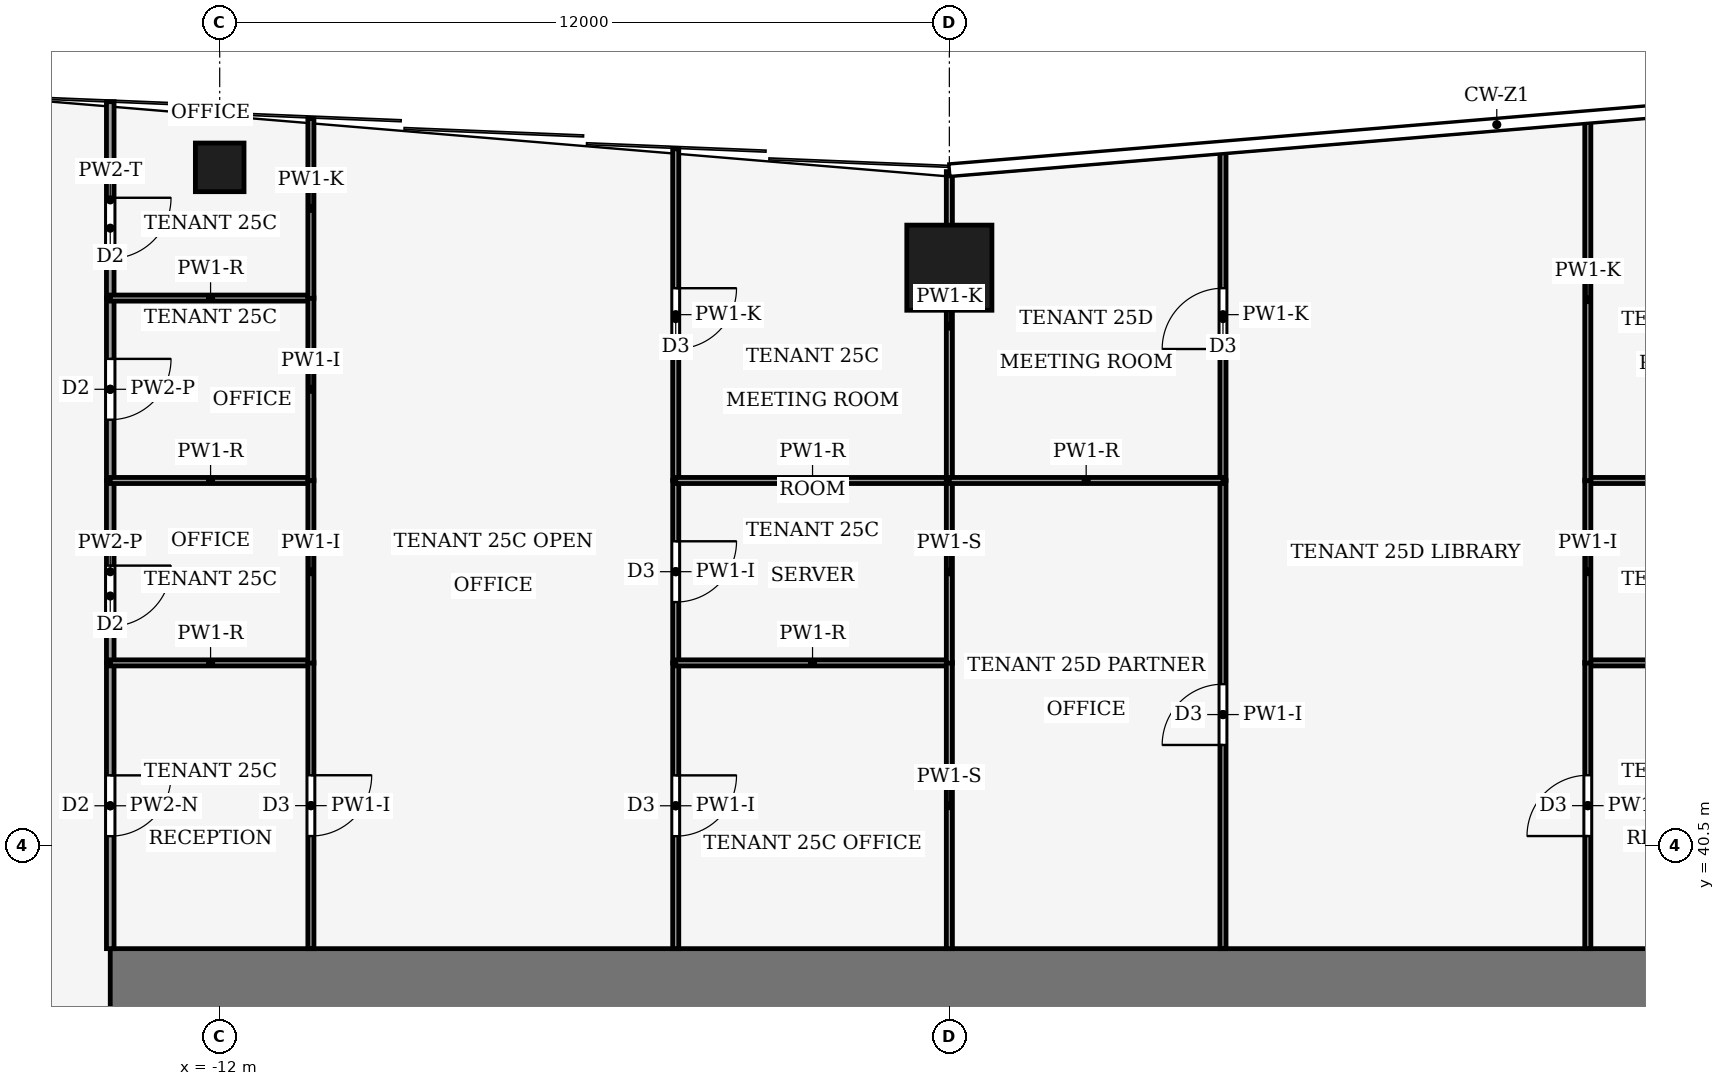
"""IFC4 building model, lengths in metres.
Left out: names, types, materials, properties, quantities, classifications, styles, units other than length and angle.
Written with IfcOpenShell. Run it as: python <this file> out.ifc"""

import sys

from ifc_helpers import new_model, si_unit, direction, frame, frame_2d, origin, origin_2d, place, context, subcontext, project, spatial, rectangle, hollow_rectangle, extrude, element, fill, save


model = new_model("IFC4")
c1 = context("Model", 3, precision=1e-05, world=origin(), true_north=direction((0.0, 1.0)))
c2 = subcontext(c1, "Body", "Model", "MODEL_VIEW")
j1 = project(units=[si_unit("LENGTHUNIT", "METRE"), si_unit("PLANEANGLEUNIT", "RADIAN")], contexts=[c1])
p1 = place(None, origin())
s1 = spatial("IfcSite", under=j1, at=p1, CompositionType="ELEMENT")
p2 = place(p1, origin())
s2 = spatial("IfcBuilding", under=s1, at=p2, CompositionType="ELEMENT")
p3 = place(p2, frame((0.0, 0.0, 110.0)))
s3 = spatial("IfcBuildingStorey", under=s2, at=p3, CompositionType="ELEMENT", Elevation=110.0)
p4 = place(p3, frame((-13.8, 38.2, -0.13), z_axis=(0.0, 0.0, 1.0), x_axis=(1.0, 0.0, 0.0)))
e1 = element("IfcWall", 1, at=p4, inside=s3, PredefinedType="SHEAR", context=c2, shape_type="SweptSolid", body=[
    extrude(rectangle(XDim=27.6, YDim=1.2, at=frame_2d((13.8, 0.0))), origin(), (0.0, 0.0, 1.0), 3.88),
])
p5 = place(p3, frame((0.0, 50.0, 0.0), z_axis=(0.0, 0.0, 1.0), x_axis=(1.0, 0.0, 0.0)))
e2 = element("IfcColumn", 2, at=p5, inside=s3, PredefinedType="COLUMN", context=c2, shape_type="SweptSolid", body=[
    extrude(hollow_rectangle(XDim=1.4, YDim=1.4, WallThickness=0.08, at=origin_2d()), origin(), (0.0, 0.0, 1.0), 4.0),
])
p6 = place(p3, frame((-12.0, 51.65, 0.0), z_axis=(0.0, 0.0, 1.0), x_axis=(1.0, 0.0, 0.0)))
e3 = element("IfcColumn", 3, at=p6, inside=s3, PredefinedType="COLUMN", context=c2, shape_type="SweptSolid", body=[
    extrude(hollow_rectangle(XDim=0.8, YDim=0.8, WallThickness=0.04, at=origin_2d()), origin(), (0.0, 0.0, 1.0), 4.0),
])
p7 = place(p3, frame((-13.8, 43.5, 0.0), z_axis=(0.0, 0.0, 1.0), x_axis=(0.0, -1.0, 0.0)))
e4 = element("IfcWall", 4, at=p7, inside=s3, PredefinedType="PARTITIONING", context=c2, shape_type="SweptSolid", body=[
    extrude(rectangle(XDim=4.7, YDim=0.125, at=frame_2d((2.35, 0.0))), origin(), (0.0, 0.0, 1.0), 3.02),
])
p8 = place(p7, frame((1.85, 0.0, 0.0)))
e5 = element("IfcOpeningElement", 5, at=p8, cuts=e4, PredefinedType="OPENING", context=c2, shape_type="SweptSolid", body=[
    extrude(rectangle(XDim=1.0, YDim=2.1, at=frame_2d((0.5, 1.05))), frame((0.0, 0.073, 0.0), z_axis=(0.0, -1.0, 0.0), x_axis=(1.0, 0.0, 0.0)), (0.0, 0.0, 1.0), 0.145),
])
p9 = place(p3, frame((-13.8, 46.5, 0.0), z_axis=(0.0, 0.0, 1.0), x_axis=(0.0, -1.0, 0.0)))
e6 = element("IfcWall", 6, at=p9, inside=s3, PredefinedType="PARTITIONING", context=c2, shape_type="SweptSolid", body=[
    extrude(rectangle(XDim=3.0, YDim=0.125, at=frame_2d((1.5, 0.0))), origin(), (0.0, 0.0, 1.0), 3.75),
])
p10 = place(p9, frame((1.4, 0.0, 0.0)))
e7 = element("IfcOpeningElement", 7, at=p10, cuts=e6, PredefinedType="OPENING", context=c2, shape_type="SweptSolid", body=[
    extrude(rectangle(XDim=1.0, YDim=2.1, at=frame_2d((0.5, 1.05))), frame((0.0, 0.073, 0.0), z_axis=(0.0, -1.0, 0.0), x_axis=(1.0, 0.0, 0.0)), (0.0, 0.0, 1.0), 0.145),
])
p11 = place(p3, frame((-13.8, 49.5, 0.0), z_axis=(0.0, 0.0, 1.0), x_axis=(0.0, -1.0, 0.0)))
e8 = element("IfcWall", 8, at=p11, inside=s3, PredefinedType="PARTITIONING", context=c2, shape_type="SweptSolid", body=[
    extrude(rectangle(XDim=3.0, YDim=0.125, at=frame_2d((1.5, 0.0))), origin(), (0.0, 0.0, 1.0), 3.75),
])
p12 = place(p11, frame((1.0, 0.0, 0.0)))
e9 = element("IfcOpeningElement", 9, at=p12, cuts=e8, PredefinedType="OPENING", context=c2, shape_type="SweptSolid", body=[
    extrude(rectangle(XDim=1.0, YDim=2.1, at=frame_2d((0.5, 1.05))), frame((0.0, 0.073, 0.0), z_axis=(0.0, -1.0, 0.0), x_axis=(1.0, 0.0, 0.0)), (0.0, 0.0, 1.0), 0.145),
])
p13 = place(p3, frame((-13.8, 52.73, 0.0), z_axis=(0.0, 0.0, 1.0), x_axis=(0.0, -1.0, 0.0)))
e10 = element("IfcWall", 10, at=p13, inside=s3, PredefinedType="PARTITIONING", context=c2, shape_type="SweptSolid", body=[
    extrude(rectangle(XDim=3.23, YDim=0.125, at=frame_2d((1.615, 0.0))), origin(), (0.0, 0.0, 1.0), 2.92),
])
p14 = place(p13, frame((1.58, 0.0, 0.0)))
e11 = element("IfcOpeningElement", 11, at=p14, cuts=e10, PredefinedType="OPENING", context=c2, shape_type="SweptSolid", body=[
    extrude(rectangle(XDim=1.0, YDim=2.1, at=frame_2d((0.5, 1.05))), frame((0.0, 0.073, 0.0), z_axis=(0.0, -1.0, 0.0), x_axis=(1.0, 0.0, 0.0)), (0.0, 0.0, 1.0), 0.145),
])
p15 = place(p3, frame((-10.5, 43.5, 0.0), z_axis=(0.0, 0.0, 1.0), x_axis=(-1.0, 0.0, 0.0)))
e12 = element("IfcWall", 12, at=p15, inside=s3, PredefinedType="PARTITIONING", context=c2, shape_type="SweptSolid", body=[
    extrude(rectangle(XDim=3.3, YDim=0.1, at=frame_2d((1.65, 0.0))), origin(), (0.0, 0.0, 1.0), 3.27),
])
p16 = place(p3, frame((-10.5, 43.504, 0.0), z_axis=(0.0, 0.0, 1.0), x_axis=(0.0, -1.0, 0.0)))
e13 = element("IfcWall", 13, at=p16, inside=s3, PredefinedType="PARTITIONING", context=c2, shape_type="SweptSolid", body=[
    extrude(rectangle(XDim=4.704, YDim=0.1, at=frame_2d((2.352, 0.0))), origin(), (0.0, 0.0, 1.0), 3.75),
])
p17 = place(p16, frame((1.852, 0.0, 0.0)))
e14 = element("IfcOpeningElement", 14, at=p17, cuts=e13, PredefinedType="OPENING", context=c2, shape_type="SweptSolid", body=[
    extrude(rectangle(XDim=1.0, YDim=2.1, at=frame_2d((0.5, 1.05))), frame((0.0, 0.06, 0.0), z_axis=(0.0, -1.0, 0.0), x_axis=(1.0, 0.0, 0.0)), (0.0, 0.0, 1.0), 0.12),
])
p18 = place(p3, frame((-10.5, 46.5, 0.0), z_axis=(0.0, 0.0, 1.0), x_axis=(-1.0, 0.0, 0.0)))
e15 = element("IfcWall", 15, at=p18, inside=s3, PredefinedType="PARTITIONING", context=c2, shape_type="SweptSolid", body=[
    extrude(rectangle(XDim=3.3, YDim=0.1, at=frame_2d((1.65, 0.0))), origin(), (0.0, 0.0, 1.0), 3.27),
])
p19 = place(p3, frame((-10.5, 43.496, 0.0), z_axis=(0.0, 0.0, 1.0), x_axis=(0.0, 1.0, 0.0)))
e16 = element("IfcWall", 16, at=p19, inside=s3, PredefinedType="PARTITIONING", context=c2, shape_type="SweptSolid", body=[
    extrude(rectangle(XDim=3.008, YDim=0.1, at=frame_2d((1.504, 0.0))), origin(), (0.0, 0.0, 1.0), 3.75),
])
p20 = place(p3, frame((-10.5, 49.5, 0.0), z_axis=(0.0, 0.0, 1.0), x_axis=(-1.0, 0.0, 0.0)))
e17 = element("IfcWall", 17, at=p20, inside=s3, PredefinedType="PARTITIONING", context=c2, shape_type="SweptSolid", body=[
    extrude(rectangle(XDim=3.3, YDim=0.1, at=frame_2d((1.65, 0.0))), origin(), (0.0, 0.0, 1.0), 3.27),
])
p21 = place(p3, frame((-10.5, 46.496, 0.0), z_axis=(0.0, 0.0, 1.0), x_axis=(0.0, 1.0, 0.0)))
e18 = element("IfcWall", 18, at=p21, inside=s3, PredefinedType="PARTITIONING", context=c2, shape_type="SweptSolid", body=[
    extrude(rectangle(XDim=3.008, YDim=0.1, at=frame_2d((1.504, 0.0))), origin(), (0.0, 0.0, 1.0), 3.75),
])
p22 = place(p3, frame((-10.5, 49.496, 0.0), z_axis=(0.0, 0.0, 1.0), x_axis=(0.0, 1.0, 0.0)))
e19 = element("IfcWall", 19, at=p22, inside=s3, PredefinedType="PARTITIONING", context=c2, shape_type="SweptSolid", body=[
    extrude(rectangle(XDim=2.959, YDim=0.1, at=frame_2d((1.479, 0.0))), origin(), (0.0, 0.0, 1.0), 2.92),
])
p23 = place(p3, frame((-4.5, 43.5, 0.0), z_axis=(0.0, 0.0, 1.0), x_axis=(0.0, -1.0, 0.0)))
e20 = element("IfcWall", 20, at=p23, inside=s3, PredefinedType="PARTITIONING", context=c2, shape_type="SweptSolid", body=[
    extrude(rectangle(XDim=4.7, YDim=0.1, at=frame_2d((2.35, 0.0))), origin(), (0.0, 0.0, 1.0), 3.75),
])
p24 = place(p23, frame((1.85, 0.0, 0.0)))
e21 = element("IfcOpeningElement", 21, at=p24, cuts=e20, PredefinedType="OPENING", context=c2, shape_type="SweptSolid", body=[
    extrude(rectangle(XDim=1.0, YDim=2.1, at=frame_2d((0.5, 1.05))), frame((0.0, 0.06, 0.0), z_axis=(0.0, -1.0, 0.0), x_axis=(1.0, 0.0, 0.0)), (0.0, 0.0, 1.0), 0.12),
])
p25 = place(p3, frame((-4.5, 46.5, 0.0), z_axis=(0.0, 0.0, 1.0), x_axis=(0.0, -1.0, 0.0)))
e22 = element("IfcWall", 22, at=p25, inside=s3, PredefinedType="PARTITIONING", context=c2, shape_type="SweptSolid", body=[
    extrude(rectangle(XDim=3.0, YDim=0.1, at=frame_2d((1.5, 0.0))), origin(), (0.0, 0.0, 1.0), 3.75),
])
p26 = place(p25, frame((1.0, 0.0, 0.0)))
e23 = element("IfcOpeningElement", 23, at=p26, cuts=e22, PredefinedType="OPENING", context=c2, shape_type="SweptSolid", body=[
    extrude(rectangle(XDim=1.0, YDim=2.1, at=frame_2d((0.5, 1.05))), frame((0.0, 0.06, 0.0), z_axis=(0.0, -1.0, 0.0), x_axis=(1.0, 0.0, 0.0)), (0.0, 0.0, 1.0), 0.12),
])
p27 = place(p3, frame((-4.5, 51.955, 0.0), z_axis=(0.0, 0.0, 1.0), x_axis=(0.0, -1.0, 0.0)))
e24 = element("IfcWall", 24, at=p27, inside=s3, PredefinedType="PARTITIONING", context=c2, shape_type="SweptSolid", body=[
    extrude(rectangle(XDim=5.455, YDim=0.1, at=frame_2d((2.728, 0.0))), origin(), (0.0, 0.0, 1.0), 2.92),
])
p28 = place(p27, frame((2.292, 0.0, 0.0)))
e25 = element("IfcOpeningElement", 25, at=p28, cuts=e24, PredefinedType="OPENING", context=c2, shape_type="SweptSolid", body=[
    extrude(rectangle(XDim=1.0, YDim=2.1, at=frame_2d((0.5, 1.05))), frame((0.0, 0.06, 0.0), z_axis=(0.0, -1.0, 0.0), x_axis=(1.0, 0.0, 0.0)), (0.0, 0.0, 1.0), 0.12),
])
p29 = place(p3, frame((0.0, 43.5, 0.0), z_axis=(0.0, 0.0, 1.0), x_axis=(-1.0, 0.0, 0.0)))
e26 = element("IfcWall", 26, at=p29, inside=s3, PredefinedType="PARTITIONING", context=c2, shape_type="SweptSolid", body=[
    extrude(rectangle(XDim=4.5, YDim=0.1, at=frame_2d((2.25, 0.0))), origin(), (0.0, 0.0, 1.0), 3.27),
])
p30 = place(p3, frame((0.0, 38.8, 0.0), z_axis=(0.0, 0.0, 1.0), x_axis=(0.0, 1.0, 0.0)))
e27 = element("IfcWall", 27, at=p30, inside=s3, PredefinedType="PARTITIONING", context=c2, shape_type="SweptSolid", body=[
    extrude(rectangle(XDim=4.704, YDim=0.1, at=frame_2d((2.352, 0.0))), origin(), (0.0, 0.0, 1.0), 3.32),
])
p31 = place(p3, frame((0.0, 46.5, 0.0), z_axis=(0.0, 0.0, 1.0), x_axis=(-1.0, 0.0, 0.0)))
e28 = element("IfcWall", 28, at=p31, inside=s3, PredefinedType="PARTITIONING", context=c2, shape_type="SweptSolid", body=[
    extrude(rectangle(XDim=4.5, YDim=0.1, at=frame_2d((2.25, 0.0))), origin(), (0.0, 0.0, 1.0), 3.27),
])
p32 = place(p3, frame((0.0, 43.496, 0.0), z_axis=(0.0, 0.0, 1.0), x_axis=(0.0, 1.0, 0.0)))
e29 = element("IfcWall", 29, at=p32, inside=s3, PredefinedType="PARTITIONING", context=c2, shape_type="SweptSolid", body=[
    extrude(rectangle(XDim=3.004, YDim=0.1, at=frame_2d((1.502, 0.0))), origin(), (0.0, 0.0, 1.0), 3.32),
])
p33 = place(p3, frame((0.0, 46.5, 0.0), z_axis=(0.0, 0.0, 1.0), x_axis=(0.0, 1.0, 0.0)))
e30 = element("IfcWall", 30, at=p33, inside=s3, PredefinedType="PARTITIONING", context=c2, shape_type="SweptSolid", body=[
    extrude(rectangle(XDim=5.08, YDim=0.1, at=frame_2d((2.54, 0.0))), origin(), (0.0, 0.0, 1.0), 2.92),
])
p34 = place(p3, frame((13.8, 43.5, 0.0), z_axis=(0.0, 0.0, 1.0), x_axis=(-1.0, 0.0, 0.0)))
e31 = element("IfcWall", 31, at=p34, inside=s3, PredefinedType="PARTITIONING", context=c2, shape_type="SweptSolid", body=[
    extrude(rectangle(XDim=3.3, YDim=0.1, at=frame_2d((1.65, 0.0))), origin(), (0.0, 0.0, 1.0), 3.27),
])
p35 = place(p3, frame((10.5, 38.8, 0.0), z_axis=(0.0, 0.0, 1.0), x_axis=(0.0, 1.0, 0.0)))
e32 = element("IfcWall", 32, at=p35, inside=s3, PredefinedType="PARTITIONING", context=c2, shape_type="SweptSolid", body=[
    extrude(rectangle(XDim=4.704, YDim=0.1, at=frame_2d((2.352, 0.0))), origin(), (0.0, 0.0, 1.0), 3.75),
])
p36 = place(p35, frame((1.852, 0.0, 0.0)))
e33 = element("IfcOpeningElement", 33, at=p36, cuts=e32, PredefinedType="OPENING", context=c2, shape_type="SweptSolid", body=[
    extrude(rectangle(XDim=1.0, YDim=2.1, at=frame_2d((0.5, 1.05))), frame((0.0, 0.06, 0.0), z_axis=(0.0, -1.0, 0.0), x_axis=(1.0, 0.0, 0.0)), (0.0, 0.0, 1.0), 0.12),
])
p37 = place(p3, frame((13.8, 46.5, 0.0), z_axis=(0.0, 0.0, 1.0), x_axis=(-1.0, 0.0, 0.0)))
e34 = element("IfcWall", 34, at=p37, inside=s3, PredefinedType="PARTITIONING", context=c2, shape_type="SweptSolid", body=[
    extrude(rectangle(XDim=3.3, YDim=0.1, at=frame_2d((1.65, 0.0))), origin(), (0.0, 0.0, 1.0), 3.27),
])
p38 = place(p3, frame((10.5, 46.504, 0.0), z_axis=(0.0, 0.0, 1.0), x_axis=(0.0, -1.0, 0.0)))
e35 = element("IfcWall", 35, at=p38, inside=s3, PredefinedType="PARTITIONING", context=c2, shape_type="SweptSolid", body=[
    extrude(rectangle(XDim=3.008, YDim=0.1, at=frame_2d((1.504, 0.0))), origin(), (0.0, 0.0, 1.0), 3.75),
])
p39 = place(p3, frame((10.5, 52.455, 0.0), z_axis=(0.0, 0.0, 1.0), x_axis=(0.0, -1.0, 0.0)))
e36 = element("IfcWall", 36, at=p39, inside=s3, PredefinedType="PARTITIONING", context=c2, shape_type="SweptSolid", body=[
    extrude(rectangle(XDim=5.959, YDim=0.1, at=frame_2d((2.979, 0.0))), origin(), (0.0, 0.0, 1.0), 2.92),
])
p40 = place(p3, frame((4.5, 38.8, 0.0), z_axis=(0.0, 0.0, 1.0), x_axis=(0.0, 1.0, 0.0)))
e37 = element("IfcWall", 37, at=p40, inside=s3, PredefinedType="PARTITIONING", context=c2, shape_type="SweptSolid", body=[
    extrude(rectangle(XDim=7.7, YDim=0.1, at=frame_2d((3.85, 0.0))), origin(), (0.0, 0.0, 1.0), 3.75),
])
p41 = place(p40, frame((3.35, 0.0, 0.0)))
e38 = element("IfcOpeningElement", 38, at=p41, cuts=e37, PredefinedType="OPENING", context=c2, shape_type="SweptSolid", body=[
    extrude(rectangle(XDim=1.0, YDim=2.1, at=frame_2d((0.5, 1.05))), frame((0.0, 0.06, 0.0), z_axis=(0.0, -1.0, 0.0), x_axis=(1.0, 0.0, 0.0)), (0.0, 0.0, 1.0), 0.12),
])
p42 = place(p3, frame((4.5, 46.5, 0.0), z_axis=(0.0, 0.0, 1.0), x_axis=(0.0, 1.0, 0.0)))
e39 = element("IfcWall", 39, at=p42, inside=s3, PredefinedType="PARTITIONING", context=c2, shape_type="SweptSolid", body=[
    extrude(rectangle(XDim=5.455, YDim=0.1, at=frame_2d((2.728, 0.0))), origin(), (0.0, 0.0, 1.0), 2.92),
])
p43 = place(p42, frame((2.162, 0.0, 0.0)))
e40 = element("IfcOpeningElement", 40, at=p43, cuts=e39, PredefinedType="OPENING", context=c2, shape_type="SweptSolid", body=[
    extrude(rectangle(XDim=1.0, YDim=2.1, at=frame_2d((0.5, 1.05))), frame((0.0, 0.06, 0.0), z_axis=(0.0, -1.0, 0.0), x_axis=(1.0, 0.0, 0.0)), (0.0, 0.0, 1.0), 0.12),
])
p44 = place(p3, frame((4.5, 46.5, 0.0), z_axis=(0.0, 0.0, 1.0), x_axis=(-1.0, 0.0, 0.0)))
e41 = element("IfcWall", 41, at=p44, inside=s3, PredefinedType="PARTITIONING", context=c2, shape_type="SweptSolid", body=[
    extrude(rectangle(XDim=4.5, YDim=0.1, at=frame_2d((2.25, 0.0))), origin(), (0.0, 0.0, 1.0), 3.27),
])
p45 = place(p8, origin())
e42 = element("IfcDoor", 42, at=p45, inside=s3, OperationType="SINGLE_SWING_RIGHT", PredefinedType="DOOR", context=c2, shape_type="SweptSolid", body=[
    extrude(rectangle(XDim=1.0, YDim=2.1, at=frame_2d((0.5, 1.05))), frame((0.0, 0.025, 0.0), z_axis=(0.0, -1.0, 0.0), x_axis=(1.0, 0.0, 0.0)), (0.0, 0.0, 1.0), 0.05),
])
fill(e5, e42)
p46 = place(p10, origin())
e43 = element("IfcDoor", 43, at=p46, inside=s3, OperationType="SINGLE_SWING_RIGHT", PredefinedType="DOOR", context=c2, shape_type="SweptSolid", body=[
    extrude(rectangle(XDim=1.0, YDim=2.1, at=frame_2d((0.5, 1.05))), frame((0.0, 0.025, 0.0), z_axis=(0.0, -1.0, 0.0), x_axis=(1.0, 0.0, 0.0)), (0.0, 0.0, 1.0), 0.05),
])
fill(e7, e43)
p47 = place(p12, origin())
e44 = element("IfcDoor", 44, at=p47, inside=s3, OperationType="SINGLE_SWING_RIGHT", PredefinedType="DOOR", context=c2, shape_type="SweptSolid", body=[
    extrude(rectangle(XDim=1.0, YDim=2.1, at=frame_2d((0.5, 1.05))), frame((0.0, 0.025, 0.0), z_axis=(0.0, -1.0, 0.0), x_axis=(1.0, 0.0, 0.0)), (0.0, 0.0, 1.0), 0.05),
])
fill(e9, e44)
p48 = place(p14, origin())
e45 = element("IfcDoor", 45, at=p48, inside=s3, OperationType="SINGLE_SWING_RIGHT", PredefinedType="DOOR", context=c2, shape_type="SweptSolid", body=[
    extrude(rectangle(XDim=1.0, YDim=2.1, at=frame_2d((0.5, 1.05))), frame((0.0, 0.025, 0.0), z_axis=(0.0, -1.0, 0.0), x_axis=(1.0, 0.0, 0.0)), (0.0, 0.0, 1.0), 0.05),
])
fill(e11, e45)
p49 = place(p17, origin())
e46 = element("IfcDoor", 46, at=p49, inside=s3, OperationType="SINGLE_SWING_RIGHT", PredefinedType="DOOR", context=c2, shape_type="SweptSolid", body=[
    extrude(rectangle(XDim=1.0, YDim=2.1, at=frame_2d((0.5, 1.05))), frame((0.0, 0.025, 0.0), z_axis=(0.0, -1.0, 0.0), x_axis=(1.0, 0.0, 0.0)), (0.0, 0.0, 1.0), 0.05),
])
fill(e14, e46)
p50 = place(p24, origin())
e47 = element("IfcDoor", 47, at=p50, inside=s3, OperationType="SINGLE_SWING_LEFT", PredefinedType="DOOR", context=c2, shape_type="SweptSolid", body=[
    extrude(rectangle(XDim=1.0, YDim=2.1, at=frame_2d((0.5, 1.05))), frame((0.0, 0.025, 0.0), z_axis=(0.0, -1.0, 0.0), x_axis=(1.0, 0.0, 0.0)), (0.0, 0.0, 1.0), 0.05),
])
fill(e21, e47)
p51 = place(p26, origin())
e48 = element("IfcDoor", 48, at=p51, inside=s3, OperationType="SINGLE_SWING_RIGHT", PredefinedType="DOOR", context=c2, shape_type="SweptSolid", body=[
    extrude(rectangle(XDim=1.0, YDim=2.1, at=frame_2d((0.5, 1.05))), frame((0.0, 0.025, 0.0), z_axis=(0.0, -1.0, 0.0), x_axis=(1.0, 0.0, 0.0)), (0.0, 0.0, 1.0), 0.05),
])
fill(e23, e48)
p52 = place(p28, origin())
e49 = element("IfcDoor", 49, at=p52, inside=s3, OperationType="SINGLE_SWING_RIGHT", PredefinedType="DOOR", context=c2, shape_type="SweptSolid", body=[
    extrude(rectangle(XDim=1.0, YDim=2.1, at=frame_2d((0.5, 1.05))), frame((0.0, 0.025, 0.0), z_axis=(0.0, -1.0, 0.0), x_axis=(1.0, 0.0, 0.0)), (0.0, 0.0, 1.0), 0.05),
])
fill(e25, e49)
p53 = place(p36, origin())
e50 = element("IfcDoor", 50, at=p53, inside=s3, OperationType="SINGLE_SWING_RIGHT", PredefinedType="DOOR", context=c2, shape_type="SweptSolid", body=[
    extrude(rectangle(XDim=1.0, YDim=2.1, at=frame_2d((0.5, 1.05))), frame((0.0, 0.025, 0.0), z_axis=(0.0, -1.0, 0.0), x_axis=(1.0, 0.0, 0.0)), (0.0, 0.0, 1.0), 0.05),
])
fill(e33, e50)
p54 = place(p41, origin())
e51 = element("IfcDoor", 51, at=p54, inside=s3, OperationType="SINGLE_SWING_LEFT", PredefinedType="DOOR", context=c2, shape_type="SweptSolid", body=[
    extrude(rectangle(XDim=1.0, YDim=2.1, at=frame_2d((0.5, 1.05))), frame((0.0, 0.025, 0.0), z_axis=(0.0, -1.0, 0.0), x_axis=(1.0, 0.0, 0.0)), (0.0, 0.0, 1.0), 0.05),
])
fill(e38, e51)
p55 = place(p43, origin())
e52 = element("IfcDoor", 52, at=p55, inside=s3, OperationType="SINGLE_SWING_LEFT", PredefinedType="DOOR", context=c2, shape_type="SweptSolid", body=[
    extrude(rectangle(XDim=1.0, YDim=2.1, at=frame_2d((0.5, 1.05))), frame((0.0, 0.025, 0.0), z_axis=(0.0, -1.0, 0.0), x_axis=(1.0, 0.0, 0.0)), (0.0, 0.0, 1.0), 0.05),
])
fill(e40, e52)
save(model, sys.argv[1])
